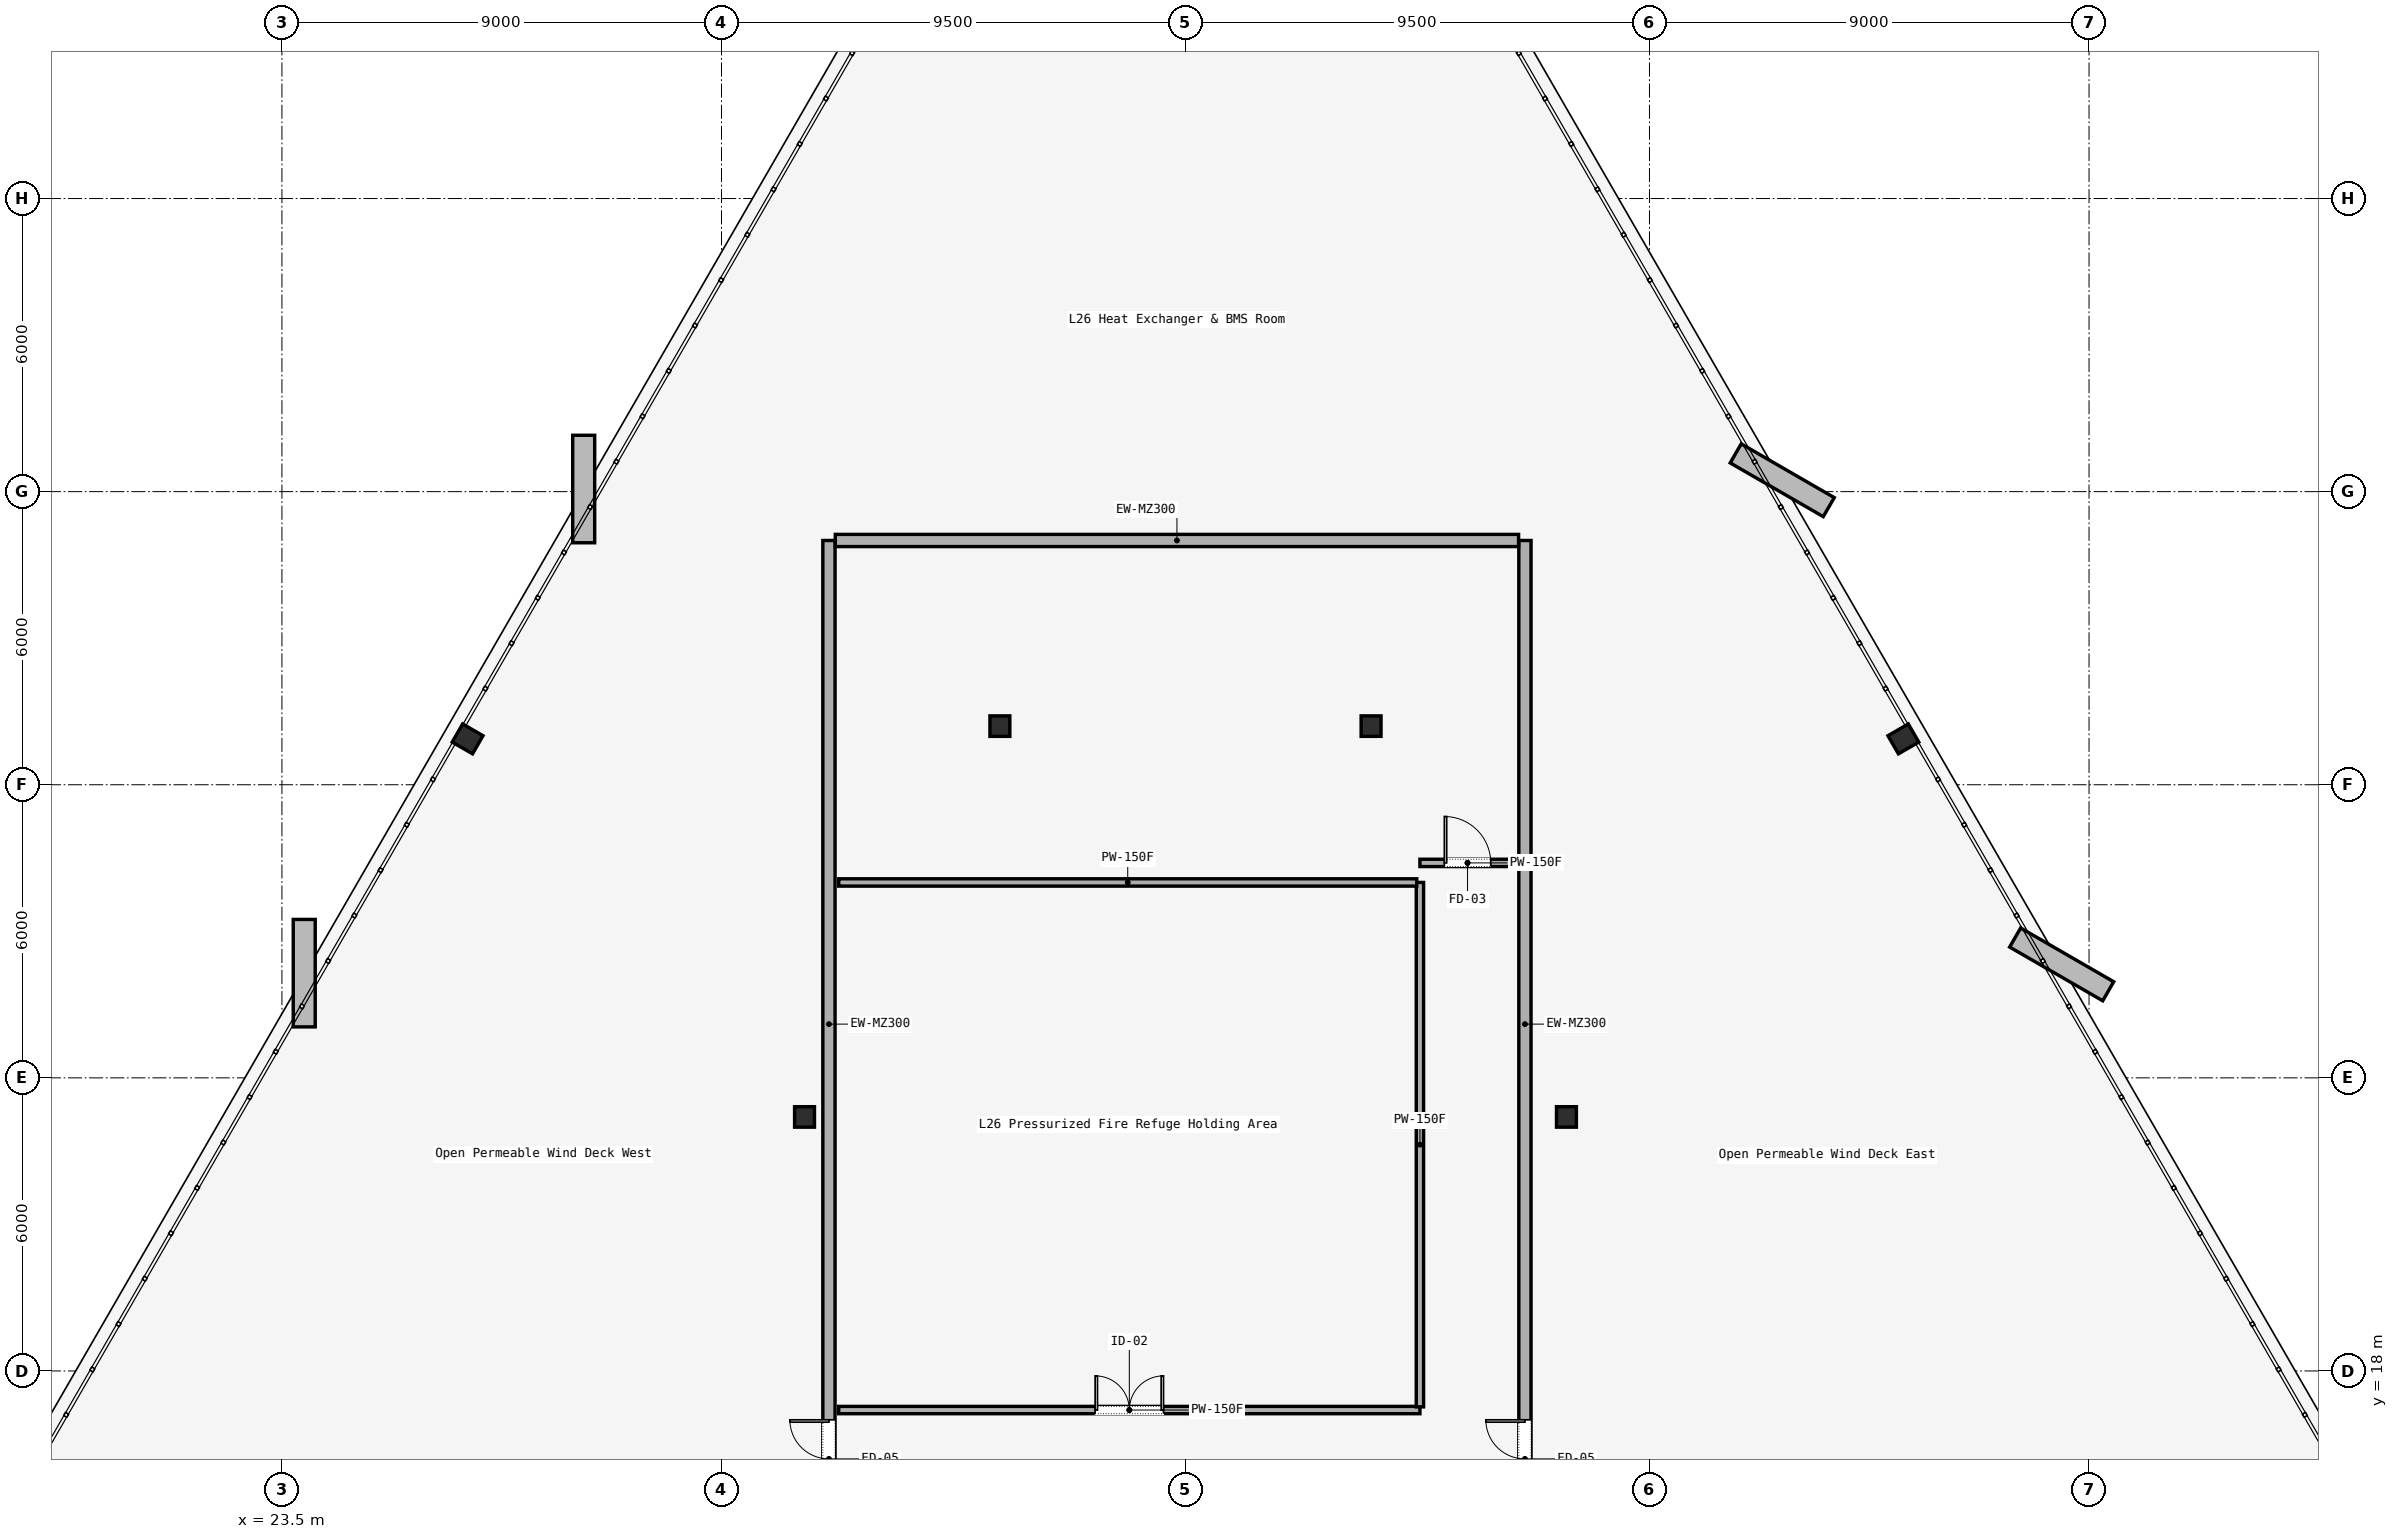
"""IFC4 building model, lengths in metres.
Left out: names, types, materials, properties, quantities, classifications, styles, units other than length and angle.
Written with IfcOpenShell. Run it as: python <this file> out.ifc"""

import sys

from ifc_helpers import new_model, si_unit, direction, frame, frame_2d, origin, origin_2d, place, context, subcontext, project, spatial, rectangle, i_section, extrude, element, fill, save


model = new_model("IFC4")
c1 = context("Model", 3, precision=1e-05, world=origin(), true_north=direction((0.0, 1.0)))
c2 = subcontext(c1, "Body", "Model", "MODEL_VIEW")
j1 = project(units=[si_unit("LENGTHUNIT", "METRE"), si_unit("PLANEANGLEUNIT", "RADIAN")], contexts=[c1])
p1 = place(None, origin())
s1 = spatial("IfcSite", under=j1, at=p1, CompositionType="ELEMENT")
p2 = place(p1, origin())
s2 = spatial("IfcBuilding", under=s1, at=p2, CompositionType="ELEMENT")
p3 = place(p2, frame((0.0, 0.0, 112.0)))
s3 = spatial("IfcBuildingStorey", under=s2, at=p3, CompositionType="ELEMENT", Elevation=112.0)
for number, where, z_axis, x_axis in (
    (1, (34.2, 23.2, 0.0), (0.0, 0.0, 1.0), (1.0, 0.0, 0.0)),
    (2, (49.8, 23.2, 0.0), (0.0, 0.0, 1.0), (1.0, 0.0, 0.0)),
    (3, (38.2, 31.2, 0.0), (0.0, 0.0, 1.0), (1.0, 0.0, 0.0)),
    (4, (45.8, 31.2, 0.0), (0.0, 0.0, 1.0), (1.0, 0.0, 0.0)),
):
    element("IfcColumn", number, at=place(p3, frame(where, z_axis=z_axis, x_axis=x_axis)), inside=s3, PredefinedType="COLUMN", context=c2, shape_type="SweptSolid", body=[
        extrude(i_section(OverallWidth=0.407, OverallDepth=0.419, WebThickness=0.031, FlangeThickness=0.049, FilletRadius=0.015, at=origin_2d()), origin(), (0.0, 0.0, 1.0), 5.12),
    ])
for number, where, z_axis, x_axis in (
    (5, (56.698, 30.938, 0.0), (0.0, 0.0, 1.0), (-0.5, 0.866, 0.0)),
    (6, (27.302, 30.938, 0.0), (0.0, 0.0, 1.0), (0.5, 0.866, 0.0)),
):
    element("IfcColumn", number, at=place(p3, frame(where, z_axis=z_axis, x_axis=x_axis)), inside=s3, PredefinedType="COLUMN", context=c2, shape_type="SweptSolid", body=[
        extrude(i_section(OverallWidth=0.428, OverallDepth=0.481, WebThickness=0.051, FlangeThickness=0.065, FilletRadius=0.015, at=origin_2d()), origin(), (0.0, 0.0, 1.0), 5.12),
    ])
p4 = place(p3, frame((34.7, 15.2, 0.0), z_axis=(0.0, 0.0, 1.0), x_axis=(0.0, 1.0, 0.0)))
e7 = element("IfcWall", 7, at=p4, inside=s3, PredefinedType="SOLIDWALL", context=c2, shape_type="SweptSolid", body=[
    extrude(rectangle(XDim=19.8, YDim=0.25, at=frame_2d((9.9, 0.0))), origin(), (0.0, 0.0, 1.0), 3.99),
])
p5 = place(p4, frame((0.2, 0.0, 0.0)))
e8 = element("IfcOpeningElement", 8, at=p5, cuts=e7, PredefinedType="OPENING", context=c2, shape_type="SweptSolid", body=[
    extrude(rectangle(XDim=1.6, YDim=2.3, at=frame_2d((0.8, 1.15))), frame((0.0, 0.125, 0.0), z_axis=(0.0, -1.0, 0.0), x_axis=(1.0, 0.0, 0.0)), (0.0, 0.0, 1.0), 0.25),
])
p6 = place(p3, frame((48.95, 15.2, 0.0), z_axis=(0.0, 0.0, 1.0), x_axis=(0.0, 1.0, 0.0)))
e9 = element("IfcWall", 9, at=p6, inside=s3, PredefinedType="SOLIDWALL", context=c2, shape_type="SweptSolid", body=[
    extrude(rectangle(XDim=19.8, YDim=0.25, at=frame_2d((9.9, 0.0))), origin(), (0.0, 0.0, 1.0), 3.99),
])
p7 = place(p6, frame((0.2, 0.0, 0.0)))
e10 = element("IfcOpeningElement", 10, at=p7, cuts=e9, PredefinedType="OPENING", context=c2, shape_type="SweptSolid", body=[
    extrude(rectangle(XDim=1.6, YDim=2.3, at=frame_2d((0.8, 1.15))), frame((0.0, 0.125, 0.0), z_axis=(0.0, -1.0, 0.0), x_axis=(1.0, 0.0, 0.0)), (0.0, 0.0, 1.0), 0.25),
])
p8 = place(p3, frame((34.83, 35.0, 0.0), z_axis=(0.0, 0.0, 1.0), x_axis=(1.0, 0.0, 0.0)))
e11 = element("IfcWall", 11, at=p8, inside=s3, PredefinedType="SOLIDWALL", context=c2, shape_type="SweptSolid", body=[
    extrude(rectangle(XDim=13.99, YDim=0.25, at=frame_2d((6.995, 0.0))), origin(), (0.0, 0.0, 1.0), 3.99),
])
p9 = place(p3, frame((34.9, 17.2, 0.0), z_axis=(0.0, 0.0, 1.0), x_axis=(1.0, 0.0, 0.0)))
e12 = element("IfcWall", 12, at=p9, inside=s3, PredefinedType="PARTITIONING", context=c2, shape_type="SweptSolid", body=[
    extrude(rectangle(XDim=11.9, YDim=0.15, at=frame_2d((5.95, 0.0))), origin(), (0.0, 0.0, 1.0), 3.99),
])
p10 = place(p9, frame((5.25, 0.0, 0.0)))
e13 = element("IfcOpeningElement", 13, at=p10, cuts=e12, PredefinedType="OPENING", context=c2, shape_type="SweptSolid", body=[
    extrude(rectangle(XDim=1.4, YDim=2.2, at=frame_2d((0.7, 1.1))), frame((0.0, 0.075, 0.0), z_axis=(0.0, -1.0, 0.0), x_axis=(1.0, 0.0, 0.0)), (0.0, 0.0, 1.0), 0.15),
])
p11 = place(p3, frame((46.8, 17.265, 0.0), z_axis=(0.0, 0.0, 1.0), x_axis=(0.0, 1.0, 0.0)))
e14 = element("IfcWall", 14, at=p11, inside=s3, PredefinedType="PARTITIONING", context=c2, shape_type="SweptSolid", body=[
    extrude(rectangle(XDim=10.735, YDim=0.15, at=frame_2d((5.368, 0.0))), origin(), (0.0, 0.0, 1.0), 3.99),
])
p12 = place(p3, frame((46.8, 28.4, 0.0), z_axis=(0.0, 0.0, 1.0), x_axis=(1.0, 0.0, 0.0)))
e15 = element("IfcWall", 15, at=p12, inside=s3, PredefinedType="PARTITIONING", context=c2, shape_type="SweptSolid", body=[
    extrude(rectangle(XDim=1.95, YDim=0.15, at=frame_2d((0.975, 0.0))), origin(), (0.0, 0.0, 1.0), 3.99),
])
p13 = place(p12, frame((0.5, 0.0, 0.0)))
e16 = element("IfcOpeningElement", 16, at=p13, cuts=e15, PredefinedType="OPENING", context=c2, shape_type="SweptSolid", body=[
    extrude(rectangle(XDim=0.95, YDim=2.2, at=frame_2d((0.475, 1.1))), frame((0.0, 0.075, 0.0), z_axis=(0.0, -1.0, 0.0), x_axis=(1.0, 0.0, 0.0)), (0.0, 0.0, 1.0), 0.15),
])
p14 = place(p3, frame((34.9, 28.0, 0.0), z_axis=(0.0, 0.0, 1.0), x_axis=(1.0, 0.0, 0.0)))
e17 = element("IfcWall", 17, at=p14, inside=s3, PredefinedType="PARTITIONING", context=c2, shape_type="SweptSolid", body=[
    extrude(rectangle(XDim=11.835, YDim=0.15, at=frame_2d((5.917, 0.0))), origin(), (0.0, 0.0, 1.0), 3.99),
])
p15 = place(p5, origin())
e18 = element("IfcDoor", 18, at=p15, inside=s3, OperationType="DOUBLE_DOOR_SINGLE_SWING", PredefinedType="DOOR", context=c2, shape_type="SweptSolid", body=[
    extrude(rectangle(XDim=1.6, YDim=2.3, at=frame_2d((0.8, 1.15))), frame((0.0, 0.025, 0.0), z_axis=(0.0, -1.0, 0.0), x_axis=(1.0, 0.0, 0.0)), (0.0, 0.0, 1.0), 0.05),
])
fill(e8, e18)
p16 = place(p7, origin())
e19 = element("IfcDoor", 19, at=p16, inside=s3, OperationType="DOUBLE_DOOR_SINGLE_SWING", PredefinedType="DOOR", context=c2, shape_type="SweptSolid", body=[
    extrude(rectangle(XDim=1.6, YDim=2.3, at=frame_2d((0.8, 1.15))), frame((0.0, 0.025, 0.0), z_axis=(0.0, -1.0, 0.0), x_axis=(1.0, 0.0, 0.0)), (0.0, 0.0, 1.0), 0.05),
])
fill(e10, e19)
p17 = place(p10, origin())
e20 = element("IfcDoor", 20, at=p17, inside=s3, OperationType="SINGLE_SWING_LEFT", PredefinedType="DOOR", context=c2, shape_type="SweptSolid", body=[
    extrude(rectangle(XDim=1.4, YDim=2.2, at=frame_2d((0.7, 1.1))), frame((0.0, 0.025, 0.0), z_axis=(0.0, -1.0, 0.0), x_axis=(1.0, 0.0, 0.0)), (0.0, 0.0, 1.0), 0.05),
])
fill(e13, e20)
p18 = place(p13, origin())
e21 = element("IfcDoor", 21, at=p18, inside=s3, OperationType="SINGLE_SWING_RIGHT", PredefinedType="DOOR", context=c2, shape_type="SweptSolid", body=[
    extrude(rectangle(XDim=0.95, YDim=2.2, at=frame_2d((0.475, 1.1))), frame((0.0, 0.025, 0.0), z_axis=(0.0, -1.0, 0.0), x_axis=(1.0, 0.0, 0.0)), (0.0, 0.0, 1.0), 0.05),
])
fill(e16, e21)
save(model, sys.argv[1])
